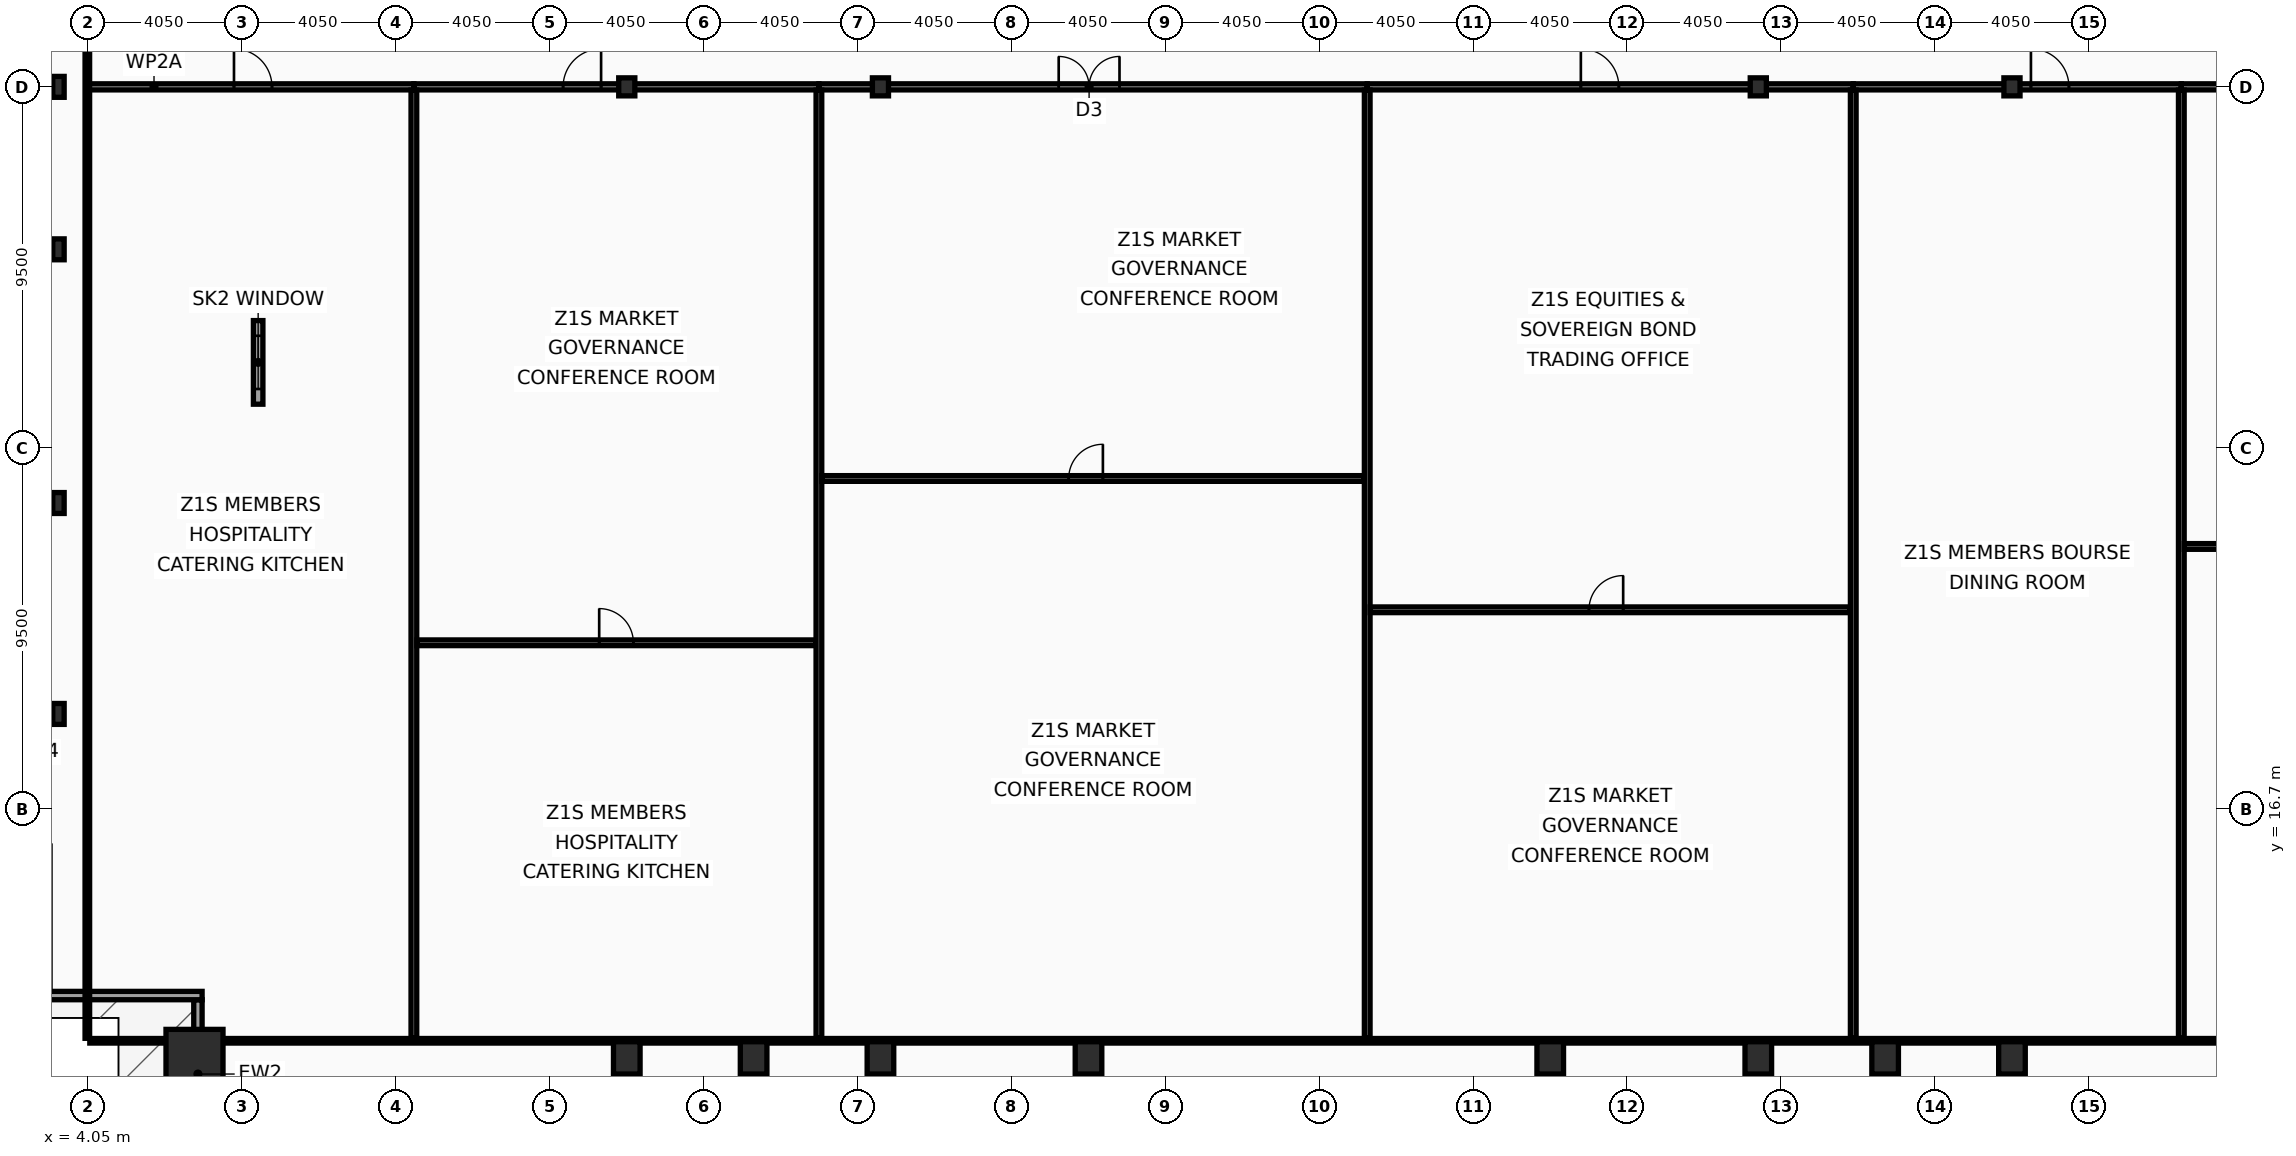
"""IFC4 building model, lengths in metres.
Left out: names, types, materials, properties, quantities, classifications, styles, units other than length and angle.
Written with IfcOpenShell. Run it as: python <this file> out.ifc"""

import sys

from ifc_helpers import new_model, si_unit, direction, frame, frame_2d, origin, origin_2d, place, context, subcontext, project, spatial, rectangle, hollow_rectangle, i_section, extrude, element, fill, save


model = new_model("IFC4")
c1 = context("Model", 3, precision=1e-05, world=origin(), true_north=direction((0.0, 1.0)))
c2 = subcontext(c1, "Body", "Model", "MODEL_VIEW")
j1 = project(units=[si_unit("LENGTHUNIT", "METRE"), si_unit("PLANEANGLEUNIT", "RADIAN")], contexts=[c1])
p1 = place(None, origin())
s1 = spatial("IfcSite", under=j1, at=p1, CompositionType="ELEMENT")
p2 = place(p1, origin())
s2 = spatial("IfcBuilding", under=s1, at=p2, CompositionType="ELEMENT")
p3 = place(p2, frame((0.0, 0.0, 81.8)))
s3 = spatial("IfcBuildingStorey", under=s2, at=p3, CompositionType="ELEMENT", Elevation=81.8)
p4 = place(p3, frame((6.85, 10.15, 0.0), z_axis=(0.0, 0.0, 1.0), x_axis=(1.0, 0.0, 0.0)))
e1 = element("IfcColumn", 1, at=p4, inside=s3, PredefinedType="COLUMN", context=c2, shape_type="SweptSolid", body=[
    extrude(hollow_rectangle(XDim=1.5, YDim=1.5, WallThickness=0.07, at=origin_2d()), origin(), (0.0, 0.0, 1.0), 4.0),
])
for number, where, z_axis, x_axis in (
    (2, (18.225, 10.15, 0.0), (0.0, 0.0, 1.0), (1.0, 0.0, 0.0)),
    (3, (21.562, 10.15, 0.0), (0.0, 0.0, 1.0), (1.0, 0.0, 0.0)),
    (4, (24.9, 10.15, 0.0), (0.0, 0.0, 1.0), (1.0, 0.0, 0.0)),
    (5, (30.375, 10.15, 0.0), (0.0, 0.0, 1.0), (1.0, 0.0, 0.0)),
    (6, (42.525, 10.15, 0.0), (0.0, 0.0, 1.0), (1.0, 0.0, 0.0)),
    (7, (48.0, 10.15, 0.0), (0.0, 0.0, 1.0), (1.0, 0.0, 0.0)),
    (8, (51.337, 10.15, 0.0), (0.0, 0.0, 1.0), (1.0, 0.0, 0.0)),
    (9, (54.675, 10.15, 0.0), (0.0, 0.0, 1.0), (1.0, 0.0, 0.0)),
):
    element("IfcColumn", number, at=place(p3, frame(where, z_axis=z_axis, x_axis=x_axis)), inside=s3, PredefinedType="COLUMN", context=c2, shape_type="SweptSolid", body=[
        extrude(hollow_rectangle(XDim=0.7, YDim=0.85, WallThickness=0.05, at=origin_2d()), origin(), (0.0, 0.0, 1.0), 4.0),
    ])
for number, where, z_axis, x_axis in (
    (10, (3.27, 19.2, 0.0), (0.0, 0.0, 1.0), (1.0, 0.0, 0.0)),
    (11, (3.27, 24.75, 0.0), (0.0, 0.0, 1.0), (1.0, 0.0, 0.0)),
    (12, (3.27, 31.425, 0.0), (0.0, 0.0, 1.0), (1.0, 0.0, 0.0)),
    (13, (3.27, 35.7, 0.0), (0.0, 0.0, 1.0), (1.0, 0.0, 0.0)),
):
    element("IfcColumn", number, at=place(p3, frame(where, z_axis=z_axis, x_axis=x_axis)), inside=s3, PredefinedType="COLUMN", context=c2, shape_type="SweptSolid", body=[
        extrude(i_section(OverallWidth=0.3, OverallDepth=0.55, WebThickness=0.015, FlangeThickness=0.029, at=origin_2d()), origin(), (0.0, 0.0, 1.0), 4.0),
    ])
for number, where, z_axis, x_axis in (
    (14, (18.225, 35.7, 0.0), (0.0, 0.0, 1.0), (1.0, 0.0, 0.0)),
    (15, (24.9, 35.7, 0.0), (0.0, 0.0, 1.0), (1.0, 0.0, 0.0)),
    (16, (48.0, 35.7, 0.0), (0.0, 0.0, 1.0), (1.0, 0.0, 0.0)),
    (17, (54.675, 35.7, 0.0), (0.0, 0.0, 1.0), (1.0, 0.0, 0.0)),
):
    element("IfcColumn", number, at=place(p3, frame(where, z_axis=z_axis, x_axis=x_axis)), inside=s3, PredefinedType="COLUMN", context=c2, shape_type="SweptSolid", body=[
        extrude(i_section(OverallWidth=0.424, OverallDepth=0.474, WebThickness=0.048, FlangeThickness=0.077, at=origin_2d()), origin(), (0.0, 0.0, 1.0), 4.0),
    ])
p5 = place(p3, frame((6.94, 7.77, 0.0), z_axis=(0.0, 0.0, 1.0), x_axis=(0.0, 1.0, 0.0)))
e18 = element("IfcWall", 18, at=p5, inside=s3, PredefinedType="SOLIDWALL", context=c2, shape_type="SweptSolid", body=[
    extrude(rectangle(XDim=3.91, YDim=0.22, at=frame_2d((1.955, 0.0))), origin(), (0.0, 0.0, 1.0), 3.12),
])
p6 = place(p3, frame((7.05, 11.79, 0.0), z_axis=(0.0, 0.0, 1.0), x_axis=(-1.0, 0.0, 0.0)))
e19 = element("IfcWall", 19, at=p6, inside=s3, PredefinedType="SOLIDWALL", context=c2, shape_type="SweptSolid", body=[
    extrude(rectangle(XDim=4.22, YDim=0.22, at=frame_2d((2.11, 0.0))), origin(), (0.0, 0.0, 1.0), 3.12),
])
p7 = place(p3, frame((8.525, 27.35, 0.0), z_axis=(0.0, 0.0, 1.0), x_axis=(0.0, 1.0, 0.0)))
e20 = element("IfcWall", 20, at=p7, inside=s3, PredefinedType="PARAPET", context=c2, shape_type="SweptSolid", body=[
    extrude(rectangle(XDim=2.2, YDim=0.25, at=frame_2d((1.1, 0.0))), origin(), (0.0, 0.0, 1.0), 0.88),
])
p8 = place(p7, frame((0.4, 0.0, 0.16)))
e21 = element("IfcOpeningElement", 21, at=p8, cuts=e20, PredefinedType="OPENING", context=c2, shape_type="SweptSolid", body=[
    extrude(rectangle(XDim=1.4, YDim=0.5, at=frame_2d((0.7, 0.25))), frame((0.0, 0.135, 0.0), z_axis=(0.0, -1.0, 0.0), x_axis=(1.0, 0.0, 0.0)), (0.0, 0.0, 1.0), 0.27),
])
p9 = place(p3, frame((4.03, 35.7, 0.0), z_axis=(0.0, 0.0, 1.0), x_axis=(1.0, 0.0, 0.0)))
e22 = element("IfcWall", 22, at=p9, inside=s3, PredefinedType="PARTITIONING", context=c2, shape_type="SweptSolid", body=[
    extrude(rectangle(XDim=8.593, YDim=0.16, at=frame_2d((4.296, 0.0))), origin(), (0.0, 0.0, 1.0), 2.97),
])
p10 = place(p9, frame((3.859, 0.0, 0.0)))
e23 = element("IfcOpeningElement", 23, at=p10, cuts=e22, PredefinedType="OPENING", context=c2, shape_type="SweptSolid", body=[
    extrude(rectangle(XDim=1.0, YDim=2.05, at=frame_2d((0.5, 1.025))), frame((0.0, 0.09, 0.0), z_axis=(0.0, -1.0, 0.0), x_axis=(1.0, 0.0, 0.0)), (0.0, 0.0, 1.0), 0.18),
])
p11 = place(p3, frame((12.623, 35.7, 0.0), z_axis=(0.0, 0.0, 1.0), x_axis=(1.0, 0.0, 0.0)))
e24 = element("IfcWall", 24, at=p11, inside=s3, PredefinedType="PARTITIONING", context=c2, shape_type="SweptSolid", body=[
    extrude(rectangle(XDim=10.658, YDim=0.16, at=frame_2d((5.329, 0.0))), origin(), (0.0, 0.0, 1.0), 2.97),
])
p12 = place(p11, frame((3.926, 0.0, 0.0)))
e25 = element("IfcOpeningElement", 25, at=p12, cuts=e24, PredefinedType="OPENING", context=c2, shape_type="SweptSolid", body=[
    extrude(rectangle(XDim=1.0, YDim=2.05, at=frame_2d((0.5, 1.025))), frame((0.0, 0.09, 0.0), z_axis=(0.0, -1.0, 0.0), x_axis=(1.0, 0.0, 0.0)), (0.0, 0.0, 1.0), 0.18),
])
p13 = place(p3, frame((12.623, 10.665, 0.0), z_axis=(0.0, 0.0, 1.0), x_axis=(0.0, 1.0, 0.0)))
e26 = element("IfcWall", 26, at=p13, inside=s3, PredefinedType="PARTITIONING", context=c2, shape_type="SweptSolid", body=[
    extrude(rectangle(XDim=24.95, YDim=0.15, at=frame_2d((12.475, 0.0))), origin(), (0.0, 0.0, 1.0), 2.97),
])
p14 = place(p3, frame((12.703, 21.072, 0.0), z_axis=(0.0, 0.0, 1.0), x_axis=(1.0, 0.0, 0.0)))
e27 = element("IfcWall", 27, at=p14, inside=s3, PredefinedType="PARTITIONING", context=c2, shape_type="SweptSolid", body=[
    extrude(rectangle(XDim=10.498, YDim=0.15, at=frame_2d((5.249, 0.0))), origin(), (0.0, 0.0, 1.0), 2.97),
])
p15 = place(p14, frame((4.796, 0.0, 0.0)))
e28 = element("IfcOpeningElement", 28, at=p15, cuts=e27, PredefinedType="OPENING", context=c2, shape_type="SweptSolid", body=[
    extrude(rectangle(XDim=0.9, YDim=2.05, at=frame_2d((0.45, 1.025))), frame((0.0, 0.085, 0.0), z_axis=(0.0, -1.0, 0.0), x_axis=(1.0, 0.0, 0.0)), (0.0, 0.0, 1.0), 0.17),
])
p16 = place(p3, frame((23.281, 35.7, 0.0), z_axis=(0.0, 0.0, 1.0), x_axis=(1.0, 0.0, 0.0)))
e29 = element("IfcWall", 29, at=p16, inside=s3, PredefinedType="PARTITIONING", context=c2, shape_type="SweptSolid", body=[
    extrude(rectangle(XDim=14.428, YDim=0.16, at=frame_2d((7.214, 0.0))), origin(), (0.0, 0.0, 1.0), 2.97),
])
p17 = place(p16, frame((6.31, 0.0, 0.0)))
e30 = element("IfcOpeningElement", 30, at=p17, cuts=e29, PredefinedType="OPENING", context=c2, shape_type="SweptSolid", body=[
    extrude(rectangle(XDim=1.6, YDim=2.15, at=frame_2d((0.8, 1.075))), frame((0.0, 0.09, 0.0), z_axis=(0.0, -1.0, 0.0), x_axis=(1.0, 0.0, 0.0)), (0.0, 0.0, 1.0), 0.18),
])
p18 = place(p3, frame((23.281, 10.665, 0.0), z_axis=(0.0, 0.0, 1.0), x_axis=(0.0, 1.0, 0.0)))
e31 = element("IfcWall", 31, at=p18, inside=s3, PredefinedType="PARTITIONING", context=c2, shape_type="SweptSolid", body=[
    extrude(rectangle(XDim=24.95, YDim=0.15, at=frame_2d((12.475, 0.0))), origin(), (0.0, 0.0, 1.0), 3.22),
])
p19 = place(p3, frame((23.361, 25.395, 0.0), z_axis=(0.0, 0.0, 1.0), x_axis=(1.0, 0.0, 0.0)))
e32 = element("IfcWall", 32, at=p19, inside=s3, PredefinedType="PARTITIONING", context=c2, shape_type="SweptSolid", body=[
    extrude(rectangle(XDim=14.268, YDim=0.15, at=frame_2d((7.134, 0.0))), origin(), (0.0, 0.0, 1.0), 2.97),
])
p20 = place(p19, frame((6.493, 0.0, 0.0)))
e33 = element("IfcOpeningElement", 33, at=p20, cuts=e32, PredefinedType="OPENING", context=c2, shape_type="SweptSolid", body=[
    extrude(rectangle(XDim=0.9, YDim=2.05, at=frame_2d((0.45, 1.025))), frame((0.0, 0.085, 0.0), z_axis=(0.0, -1.0, 0.0), x_axis=(1.0, 0.0, 0.0)), (0.0, 0.0, 1.0), 0.17),
])
p21 = place(p3, frame((37.709, 35.7, 0.0), z_axis=(0.0, 0.0, 1.0), x_axis=(1.0, 0.0, 0.0)))
e34 = element("IfcWall", 34, at=p21, inside=s3, PredefinedType="PARTITIONING", context=c2, shape_type="SweptSolid", body=[
    extrude(rectangle(XDim=12.789, YDim=0.16, at=frame_2d((6.395, 0.0))), origin(), (0.0, 0.0, 1.0), 2.97),
])
p22 = place(p21, frame((5.622, 0.0, 0.0)))
e35 = element("IfcOpeningElement", 35, at=p22, cuts=e34, PredefinedType="OPENING", context=c2, shape_type="SweptSolid", body=[
    extrude(rectangle(XDim=1.0, YDim=2.05, at=frame_2d((0.5, 1.025))), frame((0.0, 0.09, 0.0), z_axis=(0.0, -1.0, 0.0), x_axis=(1.0, 0.0, 0.0)), (0.0, 0.0, 1.0), 0.18),
])
p23 = place(p3, frame((37.709, 10.665, 0.0), z_axis=(0.0, 0.0, 1.0), x_axis=(0.0, 1.0, 0.0)))
e36 = element("IfcWall", 36, at=p23, inside=s3, PredefinedType="PARTITIONING", context=c2, shape_type="SweptSolid", body=[
    extrude(rectangle(XDim=24.95, YDim=0.15, at=frame_2d((12.475, 0.0))), origin(), (0.0, 0.0, 1.0), 3.22),
])
p24 = place(p3, frame((37.789, 21.94, 0.0), z_axis=(0.0, 0.0, 1.0), x_axis=(1.0, 0.0, 0.0)))
e37 = element("IfcWall", 37, at=p24, inside=s3, PredefinedType="PARTITIONING", context=c2, shape_type="SweptSolid", body=[
    extrude(rectangle(XDim=12.629, YDim=0.15, at=frame_2d((6.315, 0.0))), origin(), (0.0, 0.0, 1.0), 2.97),
])
p25 = place(p24, frame((5.755, 0.0, 0.0)))
e38 = element("IfcOpeningElement", 38, at=p25, cuts=e37, PredefinedType="OPENING", context=c2, shape_type="SweptSolid", body=[
    extrude(rectangle(XDim=0.9, YDim=2.05, at=frame_2d((0.45, 1.025))), frame((0.0, 0.085, 0.0), z_axis=(0.0, -1.0, 0.0), x_axis=(1.0, 0.0, 0.0)), (0.0, 0.0, 1.0), 0.17),
])
p26 = place(p3, frame((50.498, 35.7, 0.0), z_axis=(0.0, 0.0, 1.0), x_axis=(1.0, 0.0, 0.0)))
e39 = element("IfcWall", 39, at=p26, inside=s3, PredefinedType="PARTITIONING", context=c2, shape_type="SweptSolid", body=[
    extrude(rectangle(XDim=8.633, YDim=0.16, at=frame_2d((4.316, 0.0))), origin(), (0.0, 0.0, 1.0), 2.97),
])
p27 = place(p26, frame((4.676, 0.0, 0.0)))
e40 = element("IfcOpeningElement", 40, at=p27, cuts=e39, PredefinedType="OPENING", context=c2, shape_type="SweptSolid", body=[
    extrude(rectangle(XDim=1.0, YDim=2.05, at=frame_2d((0.5, 1.025))), frame((0.0, 0.09, 0.0), z_axis=(0.0, -1.0, 0.0), x_axis=(1.0, 0.0, 0.0)), (0.0, 0.0, 1.0), 0.18),
])
p28 = place(p3, frame((50.498, 10.665, 0.0), z_axis=(0.0, 0.0, 1.0), x_axis=(0.0, 1.0, 0.0)))
e41 = element("IfcWall", 41, at=p28, inside=s3, PredefinedType="PARTITIONING", context=c2, shape_type="SweptSolid", body=[
    extrude(rectangle(XDim=24.95, YDim=0.15, at=frame_2d((12.475, 0.0))), origin(), (0.0, 0.0, 1.0), 3.22),
])
p29 = place(p3, frame((59.131, 35.7, 0.0), z_axis=(0.0, 0.0, 1.0), x_axis=(1.0, 0.0, 0.0)))
e42 = element("IfcWall", 42, at=p29, inside=s3, PredefinedType="PARTITIONING", context=c2, shape_type="SweptSolid", body=[
    extrude(rectangle(XDim=9.739, YDim=0.16, at=frame_2d((4.869, 0.0))), origin(), (0.0, 0.0, 1.0), 2.97),
])
p30 = place(p29, frame((4.34, 0.0, 0.0)))
e43 = element("IfcOpeningElement", 43, at=p30, cuts=e42, PredefinedType="OPENING", context=c2, shape_type="SweptSolid", body=[
    extrude(rectangle(XDim=1.0, YDim=2.05, at=frame_2d((0.5, 1.025))), frame((0.0, 0.09, 0.0), z_axis=(0.0, -1.0, 0.0), x_axis=(1.0, 0.0, 0.0)), (0.0, 0.0, 1.0), 0.18),
])
p31 = place(p3, frame((59.131, 10.665, 0.0), z_axis=(0.0, 0.0, 1.0), x_axis=(0.0, 1.0, 0.0)))
e44 = element("IfcWall", 44, at=p31, inside=s3, PredefinedType="PARTITIONING", context=c2, shape_type="SweptSolid", body=[
    extrude(rectangle(XDim=24.95, YDim=0.15, at=frame_2d((12.475, 0.0))), origin(), (0.0, 0.0, 1.0), 2.97),
])
p32 = place(p3, frame((59.211, 23.607, 0.0), z_axis=(0.0, 0.0, 1.0), x_axis=(1.0, 0.0, 0.0)))
e45 = element("IfcWall", 45, at=p32, inside=s3, PredefinedType="PARTITIONING", context=c2, shape_type="SweptSolid", body=[
    extrude(rectangle(XDim=9.594, YDim=0.15, at=frame_2d((4.797, 0.0))), origin(), (0.0, 0.0, 1.0), 3.78),
])
p33 = place(p32, frame((4.382, 0.0, 0.0)))
e46 = element("IfcOpeningElement", 46, at=p33, cuts=e45, PredefinedType="OPENING", context=c2, shape_type="SweptSolid", body=[
    extrude(rectangle(XDim=0.9, YDim=2.05, at=frame_2d((0.45, 1.025))), frame((0.0, 0.085, 0.0), z_axis=(0.0, -1.0, 0.0), x_axis=(1.0, 0.0, 0.0)), (0.0, 0.0, 1.0), 0.17),
])
p34 = place(p3, frame((4.03, 10.665, 0.0), z_axis=(0.0, 0.0, 1.0), x_axis=(0.0, 1.0, 0.0)))
e47 = element("IfcWall", 47, at=p34, inside=s3, PredefinedType="PARTITIONING", context=c2, shape_type="SweptSolid", body=[
    extrude(rectangle(XDim=42.11, YDim=0.12, at=frame_2d((21.055, 0.0))), origin(), (0.0, 0.0, 1.0), 2.97),
])
p35 = place(p3, frame((4.095, 10.6, 0.0), z_axis=(0.0, 0.0, 1.0), x_axis=(1.0, 0.0, 0.0)))
e48 = element("IfcWall", 48, at=p35, inside=s3, PredefinedType="PARTITIONING", context=c2, shape_type="SweptSolid", body=[
    extrude(rectangle(XDim=64.71, YDim=0.12, at=frame_2d((32.355, 0.0))), origin(), (0.0, 0.0, 1.0), 2.97),
])
p36 = place(p8, origin())
e49 = element("IfcWindow", 49, at=p36, inside=s3, PartitioningType="SINGLE_PANEL", PredefinedType="SKYLIGHT", context=c2, shape_type="SweptSolid", body=[
    extrude(rectangle(XDim=1.4, YDim=0.5, at=frame_2d((0.7, 0.25))), frame((0.0, 0.03, 0.0), z_axis=(0.0, -1.0, 0.0), x_axis=(1.0, 0.0, 0.0)), (0.0, 0.0, 1.0), 0.06),
])
fill(e21, e49)
p37 = place(p10, origin())
e50 = element("IfcDoor", 50, at=p37, inside=s3, OperationType="SINGLE_SWING_LEFT", PredefinedType="DOOR", context=c2, shape_type="SweptSolid", body=[
    extrude(rectangle(XDim=1.0, YDim=2.05, at=frame_2d((0.5, 1.025))), frame((0.0, 0.025, 0.0), z_axis=(0.0, -1.0, 0.0), x_axis=(1.0, 0.0, 0.0)), (0.0, 0.0, 1.0), 0.05),
])
fill(e23, e50)
p38 = place(p12, origin())
e51 = element("IfcDoor", 51, at=p38, inside=s3, OperationType="SINGLE_SWING_RIGHT", PredefinedType="DOOR", context=c2, shape_type="SweptSolid", body=[
    extrude(rectangle(XDim=1.0, YDim=2.05, at=frame_2d((0.5, 1.025))), frame((0.0, 0.025, 0.0), z_axis=(0.0, -1.0, 0.0), x_axis=(1.0, 0.0, 0.0)), (0.0, 0.0, 1.0), 0.05),
])
fill(e25, e51)
p39 = place(p15, origin())
e52 = element("IfcDoor", 52, at=p39, inside=s3, OperationType="SINGLE_SWING_LEFT", PredefinedType="DOOR", context=c2, shape_type="SweptSolid", body=[
    extrude(rectangle(XDim=0.9, YDim=2.05, at=frame_2d((0.45, 1.025))), frame((0.0, 0.025, 0.0), z_axis=(0.0, -1.0, 0.0), x_axis=(1.0, 0.0, 0.0)), (0.0, 0.0, 1.0), 0.05),
])
fill(e28, e52)
p40 = place(p17, origin())
e53 = element("IfcDoor", 53, at=p40, inside=s3, OperationType="DOUBLE_DOOR_SINGLE_SWING", PredefinedType="DOOR", context=c2, shape_type="SweptSolid", body=[
    extrude(rectangle(XDim=1.6, YDim=2.15, at=frame_2d((0.8, 1.075))), frame((0.0, 0.025, 0.0), z_axis=(0.0, -1.0, 0.0), x_axis=(1.0, 0.0, 0.0)), (0.0, 0.0, 1.0), 0.05),
])
fill(e30, e53)
p41 = place(p20, origin())
e54 = element("IfcDoor", 54, at=p41, inside=s3, OperationType="SINGLE_SWING_RIGHT", PredefinedType="DOOR", context=c2, shape_type="SweptSolid", body=[
    extrude(rectangle(XDim=0.9, YDim=2.05, at=frame_2d((0.45, 1.025))), frame((0.0, 0.025, 0.0), z_axis=(0.0, -1.0, 0.0), x_axis=(1.0, 0.0, 0.0)), (0.0, 0.0, 1.0), 0.05),
])
fill(e33, e54)
p42 = place(p22, origin())
e55 = element("IfcDoor", 55, at=p42, inside=s3, OperationType="SINGLE_SWING_LEFT", PredefinedType="DOOR", context=c2, shape_type="SweptSolid", body=[
    extrude(rectangle(XDim=1.0, YDim=2.05, at=frame_2d((0.5, 1.025))), frame((0.0, 0.025, 0.0), z_axis=(0.0, -1.0, 0.0), x_axis=(1.0, 0.0, 0.0)), (0.0, 0.0, 1.0), 0.05),
])
fill(e35, e55)
p43 = place(p25, origin())
e56 = element("IfcDoor", 56, at=p43, inside=s3, OperationType="SINGLE_SWING_RIGHT", PredefinedType="DOOR", context=c2, shape_type="SweptSolid", body=[
    extrude(rectangle(XDim=0.9, YDim=2.05, at=frame_2d((0.45, 1.025))), frame((0.0, 0.025, 0.0), z_axis=(0.0, -1.0, 0.0), x_axis=(1.0, 0.0, 0.0)), (0.0, 0.0, 1.0), 0.05),
])
fill(e38, e56)
p44 = place(p27, origin())
e57 = element("IfcDoor", 57, at=p44, inside=s3, OperationType="SINGLE_SWING_LEFT", PredefinedType="DOOR", context=c2, shape_type="SweptSolid", body=[
    extrude(rectangle(XDim=1.0, YDim=2.05, at=frame_2d((0.5, 1.025))), frame((0.0, 0.025, 0.0), z_axis=(0.0, -1.0, 0.0), x_axis=(1.0, 0.0, 0.0)), (0.0, 0.0, 1.0), 0.05),
])
fill(e40, e57)
save(model, sys.argv[1])
